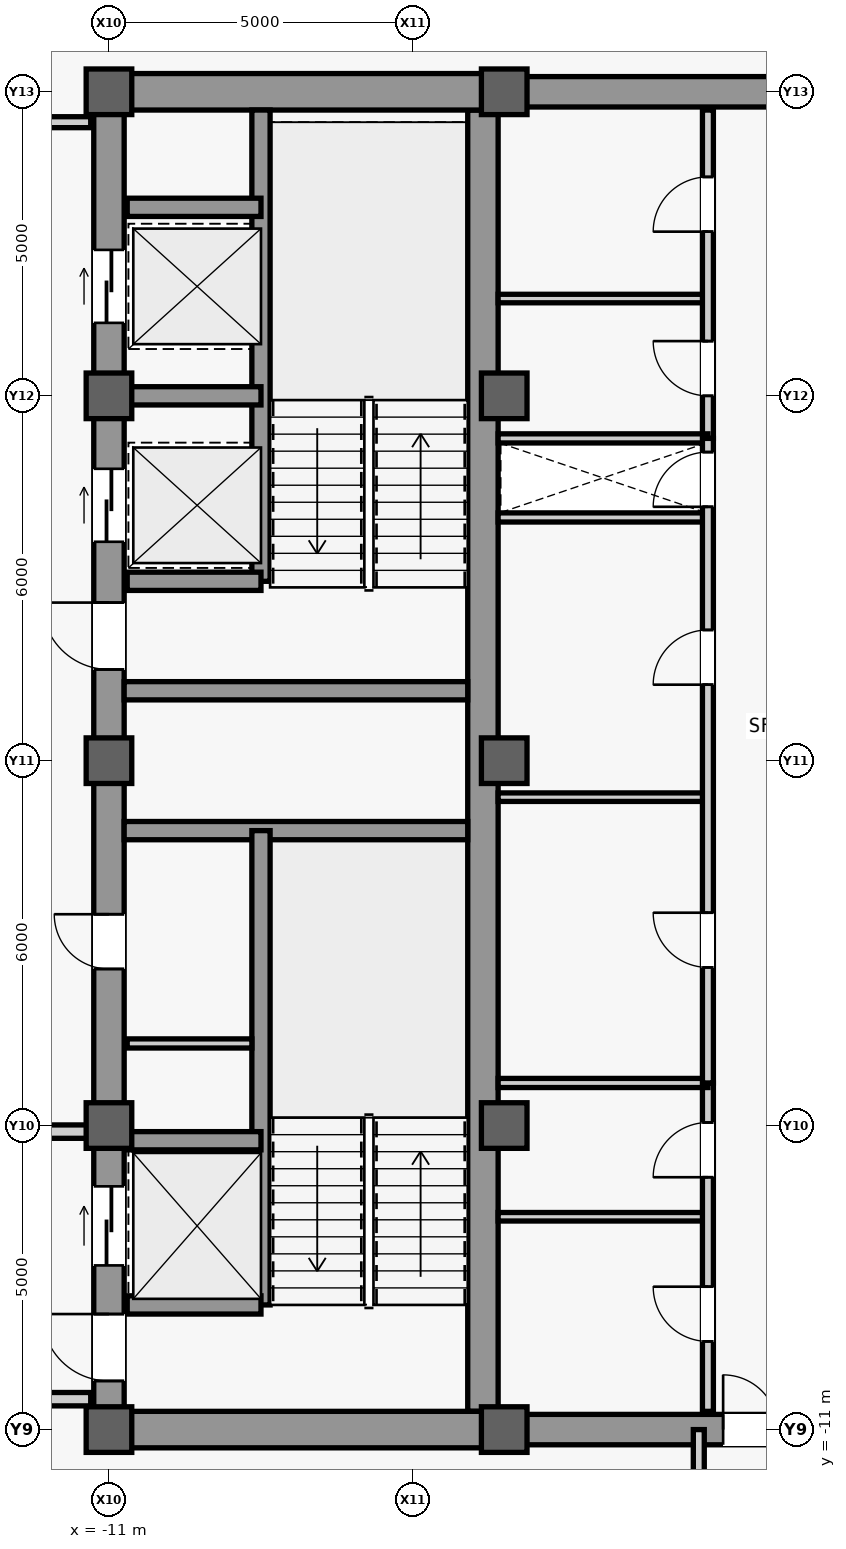
"""IFC4 building model, lengths in metres.
Left out: names, types, materials, properties, quantities, classifications, styles, units other than length and angle.
Written with IfcOpenShell. Run it as: python <this file> out.ifc"""

import sys

from ifc_helpers import new_model, si_unit, direction, frame, frame_2d, origin, origin_2d, place, context, subcontext, project, spatial, rectangle, extrude, source, transform, mapped, element, fill, save


model = new_model("IFC4")
c1 = context("Model", 3, precision=1e-05, world=origin(), true_north=direction((0.0, 1.0)))
c2 = subcontext(c1, "Body", "Model", "MODEL_VIEW")
j1 = project(units=[si_unit("LENGTHUNIT", "METRE"), si_unit("PLANEANGLEUNIT", "RADIAN")], contexts=[c1])
p1 = place(None, origin())
s1 = spatial("IfcSite", under=j1, at=p1, CompositionType="ELEMENT")
p2 = place(p1, origin())
s2 = spatial("IfcBuilding", under=s1, at=p2, CompositionType="ELEMENT")
p3 = place(p2, frame((0.0, 0.0, 289.5)))
s3 = spatial("IfcBuildingStorey", under=s2, at=p3, CompositionType="ELEMENT", Elevation=289.5)
m1 = source(origin(), c2, "Body", "SweptSolid", [
    extrude(rectangle(XDim=22.0, YDim=0.5, at=frame_2d((11.0, 0.0))), origin(), (0.0, 0.0, 1.0), 3.78),
])
p4 = place(p3, frame((-11.0, -11.0, 0.0), z_axis=(0.0, 0.0, 1.0), x_axis=(0.0, 1.0, 0.0)))
e1 = element("IfcWall", 1, at=p4, inside=s3, PredefinedType="SHEAR", context=c2, shape_type="MappedRepresentation", body=[
    mapped(m1, transform((0.0, 0.0, 0.0), scale=1.0)),
])
m2 = source(origin(), c2, "Body", "SweptSolid", [
    extrude(rectangle(XDim=1.1, YDim=2.2, at=frame_2d((0.55, 1.1))), frame((0.0, 0.26, 0.0), z_axis=(0.0, -1.0, 0.0), x_axis=(1.0, 0.0, 0.0)), (0.0, 0.0, 1.0), 0.52),
])
p5 = place(p4, frame((0.8, 0.0, 0.0)))
e2 = element("IfcOpeningElement", 2, at=p5, cuts=e1, PredefinedType="OPENING", context=c2, shape_type="MappedRepresentation", body=[
    mapped(m2, transform((0.0, 0.0, 0.0), scale=1.0)),
])
p6 = place(p4, frame((12.5, 0.0, 0.0)))
e3 = element("IfcOpeningElement", 3, at=p6, cuts=e1, PredefinedType="OPENING", context=c2, shape_type="MappedRepresentation", body=[
    mapped(m2, transform((0.0, 0.0, 0.0), scale=1.0)),
])
m3 = source(origin(), c2, "Body", "SweptSolid", [
    extrude(rectangle(XDim=0.9, YDim=2.15, at=frame_2d((0.45, 1.075))), frame((0.0, 0.26, 0.0), z_axis=(0.0, -1.0, 0.0), x_axis=(1.0, 0.0, 0.0)), (0.0, 0.0, 1.0), 0.52),
])
p7 = place(p4, frame((7.575, 0.0, 0.0)))
e4 = element("IfcOpeningElement", 4, at=p7, cuts=e1, PredefinedType="OPENING", context=c2, shape_type="MappedRepresentation", body=[
    mapped(m3, transform((0.0, 0.0, 0.0), scale=1.0)),
])
m4 = source(origin(), c2, "Body", "SweptSolid", [
    extrude(rectangle(XDim=1.2, YDim=2.3, at=frame_2d((0.6, 1.15))), frame((0.0, 0.26, 0.0), z_axis=(0.0, -1.0, 0.0), x_axis=(1.0, 0.0, 0.0)), (0.0, 0.0, 1.0), 0.52),
])
p8 = place(p4, frame((14.6, 0.0, 0.0)))
e5 = element("IfcOpeningElement", 5, at=p8, cuts=e1, PredefinedType="OPENING", context=c2, shape_type="MappedRepresentation", body=[
    mapped(m4, transform((0.0, 0.0, 0.0), scale=1.0)),
])
p9 = place(p4, frame((18.2, 0.0, 0.0)))
e6 = element("IfcOpeningElement", 6, at=p9, cuts=e1, PredefinedType="OPENING", context=c2, shape_type="MappedRepresentation", body=[
    mapped(m4, transform((0.0, 0.0, 0.0), scale=1.0)),
])
m5 = source(origin(), c2, "Body", "SweptSolid", [
    extrude(rectangle(XDim=1.3, YDim=2.3, at=frame_2d((0.65, 1.15))), frame((0.0, 0.26, 0.0), z_axis=(0.0, -1.0, 0.0), x_axis=(1.0, 0.0, 0.0)), (0.0, 0.0, 1.0), 0.52),
])
p10 = place(p4, frame((2.7, 0.0, 0.0)))
e7 = element("IfcOpeningElement", 7, at=p10, cuts=e1, PredefinedType="OPENING", context=c2, shape_type="MappedRepresentation", body=[
    mapped(m5, transform((0.0, 0.0, 0.0), scale=1.0)),
])
m6 = source(origin(), c2, "Body", "SweptSolid", [
    extrude(rectangle(XDim=21.4, YDim=0.5, at=frame_2d((10.7, 0.0))), origin(), (0.0, 0.0, 1.0), 3.78),
])
p11 = place(p3, frame((-4.85, -10.7, 0.0), z_axis=(0.0, 0.0, 1.0), x_axis=(0.0, 1.0, 0.0)))
e8 = element("IfcWall", 8, at=p11, inside=s3, PredefinedType="SHEAR", context=c2, shape_type="MappedRepresentation", body=[
    mapped(m6, transform((0.0, 0.0, 0.0), scale=1.0)),
])
m7 = source(origin(), c2, "Body", "SweptSolid", [
    extrude(rectangle(XDim=5.9, YDim=0.6, at=frame_2d((2.95, 0.0))), origin(), (0.0, 0.0, 1.0), 3.78),
])
for number, where, z_axis, x_axis in (
    (9, (-10.75, -11.0, 0.0), (0.0, 0.0, 1.0), (1.0, 0.0, 0.0)),
    (10, (-10.75, 11.0, 0.0), (0.0, 0.0, 1.0), (1.0, 0.0, 0.0)),
):
    element("IfcWall", number, at=place(p3, frame(where, z_axis=z_axis, x_axis=x_axis)), inside=s3, PredefinedType="SHEAR", context=c2, shape_type="MappedRepresentation", body=[
        mapped(m7, transform((0.0, 0.0, 0.0), scale=1.0)),
    ])
m8 = source(origin(), c2, "Body", "SweptSolid", [
    extrude(rectangle(XDim=5.65, YDim=0.3, at=frame_2d((2.825, 0.0))), origin(), (0.0, 0.0, 1.0), 3.78),
])
for number, where, z_axis, x_axis in (
    (11, (-10.75, -1.15, 0.0), (0.0, 0.0, 1.0), (1.0, 0.0, 0.0)),
    (12, (-10.75, 1.15, 0.0), (0.0, 0.0, 1.0), (1.0, 0.0, 0.0)),
):
    element("IfcWall", number, at=place(p3, frame(where, z_axis=z_axis, x_axis=x_axis)), inside=s3, PredefinedType="SHEAR", context=c2, shape_type="MappedRepresentation", body=[
        mapped(m8, transform((0.0, 0.0, 0.0), scale=1.0)),
    ])
m9 = source(origin(), c2, "Body", "SweptSolid", [
    extrude(rectangle(XDim=9.2, YDim=0.5, at=frame_2d((4.6, 0.0))), origin(), (0.0, 0.0, 1.0), 3.78),
])
p12 = place(p3, frame((-4.6, -11.0, 0.0), z_axis=(0.0, 0.0, 1.0), x_axis=(1.0, 0.0, 0.0)))
e13 = element("IfcWall", 13, at=p12, inside=s3, PredefinedType="SHEAR", context=c2, shape_type="MappedRepresentation", body=[
    mapped(m9, transform((0.0, 0.0, 0.0), scale=1.0)),
])
m10 = source(origin(), c2, "Body", "SweptSolid", [
    extrude(rectangle(XDim=1.8, YDim=2.25, at=frame_2d((0.9, 1.125))), frame((0.0, 0.26, 0.0), z_axis=(0.0, -1.0, 0.0), x_axis=(1.0, 0.0, 0.0)), (0.0, 0.0, 1.0), 0.52),
])
p13 = place(p12, frame((3.7, 0.0, 0.0)))
e14 = element("IfcOpeningElement", 14, at=p13, cuts=e13, PredefinedType="OPENING", context=c2, shape_type="MappedRepresentation", body=[
    mapped(m10, transform((0.0, 0.0, 0.0), scale=1.0)),
])
p14 = place(p3, frame((-4.6, 11.0, 0.0), z_axis=(0.0, 0.0, 1.0), x_axis=(1.0, 0.0, 0.0)))
e15 = element("IfcWall", 15, at=p14, inside=s3, PredefinedType="SHEAR", context=c2, shape_type="MappedRepresentation", body=[
    mapped(m9, transform((0.0, 0.0, 0.0), scale=1.0)),
])
m11 = source(origin(), c2, "Body", "SweptSolid", [
    extrude(rectangle(XDim=0.75, YDim=0.75, at=origin_2d()), origin(), (0.0, 0.0, 1.0), 4.0),
])
for number, where, z_axis, x_axis in (
    (16, (-11.0, -11.0, 0.0), (0.0, 0.0, 1.0), (1.0, 0.0, 0.0)),
    (17, (-11.0, -6.0, 0.0), (0.0, 0.0, 1.0), (1.0, 0.0, 0.0)),
    (18, (-11.0, 0.0, 0.0), (0.0, 0.0, 1.0), (1.0, 0.0, 0.0)),
    (19, (-11.0, 6.0, 0.0), (0.0, 0.0, 1.0), (1.0, 0.0, 0.0)),
    (20, (-11.0, 11.0, 0.0), (0.0, 0.0, 1.0), (1.0, 0.0, 0.0)),
    (21, (-4.5, -11.0, 0.0), (0.0, 0.0, 1.0), (1.0, 0.0, 0.0)),
    (22, (-4.5, -6.0, 0.0), (0.0, 0.0, 1.0), (1.0, 0.0, 0.0)),
    (23, (-4.5, 0.0, 0.0), (0.0, 0.0, 1.0), (1.0, 0.0, 0.0)),
    (24, (-4.5, 6.0, 0.0), (0.0, 0.0, 1.0), (1.0, 0.0, 0.0)),
    (25, (-4.5, 11.0, 0.0), (0.0, 0.0, 1.0), (1.0, 0.0, 0.0)),
):
    element("IfcColumn", number, at=place(p3, frame(where, z_axis=z_axis, x_axis=x_axis)), inside=s3, PredefinedType="COLUMN", context=c2, shape_type="MappedRepresentation", body=[
        mapped(m11, transform((0.0, 0.0, 0.0), scale=1.0)),
    ])
m12 = source(origin(), c2, "Body", "SweptSolid", [
    extrude(rectangle(XDim=7.8, YDim=0.3, at=frame_2d((3.9, 0.0))), origin(), (0.0, 0.0, 1.0), 3.78),
])
p15 = place(p3, frame((-8.5, -8.95, 0.0), z_axis=(0.0, 0.0, 1.0), x_axis=(0.0, 1.0, 0.0)))
e26 = element("IfcWall", 26, at=p15, inside=s3, PredefinedType="SHEAR", context=c2, shape_type="MappedRepresentation", body=[
    mapped(m12, transform((0.0, 0.0, 0.0), scale=1.0)),
])
m13 = source(origin(), c2, "Body", "SweptSolid", [
    extrude(rectangle(XDim=2.2, YDim=0.3, at=frame_2d((1.1, 0.0))), origin(), (0.0, 0.0, 1.0), 3.78),
])
for number, where, z_axis, x_axis in (
    (27, (-10.7, -8.95, 0.0), (0.0, 0.0, 1.0), (1.0, 0.0, 0.0)),
    (28, (-10.7, -6.25, 0.0), (0.0, 0.0, 1.0), (1.0, 0.0, 0.0)),
):
    element("IfcWall", number, at=place(p3, frame(where, z_axis=z_axis, x_axis=x_axis)), inside=s3, PredefinedType="SHEAR", context=c2, shape_type="MappedRepresentation", body=[
        mapped(m13, transform((0.0, 0.0, 0.0), scale=1.0)),
    ])
m14 = source(origin(), c2, "Body", "SweptSolid", [
    extrude(rectangle(XDim=7.75, YDim=0.3, at=frame_2d((3.875, 0.0))), origin(), (0.0, 0.0, 1.0), 3.78),
])
p16 = place(p3, frame((-8.5, 2.95, 0.0), z_axis=(0.0, 0.0, 1.0), x_axis=(0.0, 1.0, 0.0)))
e29 = element("IfcWall", 29, at=p16, inside=s3, PredefinedType="SHEAR", context=c2, shape_type="MappedRepresentation", body=[
    mapped(m14, transform((0.0, 0.0, 0.0), scale=1.0)),
])
for number, where, z_axis, x_axis in (
    (30, (-10.7, 2.95, 0.0), (0.0, 0.0, 1.0), (1.0, 0.0, 0.0)),
    (31, (-10.7, 6.0, 0.0), (0.0, 0.0, 1.0), (1.0, 0.0, 0.0)),
    (32, (-10.7, 9.1, 0.0), (0.0, 0.0, 1.0), (1.0, 0.0, 0.0)),
):
    element("IfcWall", number, at=place(p3, frame(where, z_axis=z_axis, x_axis=x_axis)), inside=s3, PredefinedType="SHEAR", context=c2, shape_type="MappedRepresentation", body=[
        mapped(m13, transform((0.0, 0.0, 0.0), scale=1.0)),
    ])
m15 = source(origin(), c2, "Body", "SweptSolid", [
    extrude(rectangle(XDim=2.05, YDim=0.15, at=frame_2d((1.025, 0.0))), origin(), (0.0, 0.0, 1.0), 3.78),
])
p17 = place(p3, frame((-10.7, -4.65, 0.0), z_axis=(0.0, 0.0, 1.0), x_axis=(1.0, 0.0, 0.0)))
e33 = element("IfcWall", 33, at=p17, inside=s3, PredefinedType="PARTITIONING", context=c2, shape_type="MappedRepresentation", body=[
    mapped(m15, transform((0.0, 0.0, 0.0), scale=1.0)),
])
m16 = source(origin(), c2, "Body", "SweptSolid", [
    extrude(rectangle(XDim=4.05, YDim=0.22, at=frame_2d((2.025, 0.0))), origin(), (0.0, 0.0, 1.0), 3.78),
])
p18 = place(p3, frame((-15.35, -10.5, 0.0), z_axis=(0.0, 0.0, 1.0), x_axis=(1.0, 0.0, 0.0)))
e34 = element("IfcWall", 34, at=p18, inside=s3, PredefinedType="PARTITIONING", context=c2, shape_type="MappedRepresentation", body=[
    mapped(m16, transform((0.0, 0.0, 0.0), scale=1.0)),
])
m17 = source(origin(), c2, "Body", "SweptSolid", [
    extrude(rectangle(XDim=4.05, YDim=0.22, at=frame_2d((2.025, 0.0))), origin(), (0.0, 0.0, 1.0), 3.085),
])
p19 = place(p3, frame((-15.35, -6.1, 0.0), z_axis=(0.0, 0.0, 1.0), x_axis=(1.0, 0.0, 0.0)))
e35 = element("IfcWall", 35, at=p19, inside=s3, PredefinedType="PARTITIONING", context=c2, shape_type="MappedRepresentation", body=[
    mapped(m17, transform((0.0, 0.0, 0.0), scale=1.0)),
])
m18 = source(origin(), c2, "Body", "SweptSolid", [
    extrude(rectangle(XDim=4.05, YDim=0.18, at=frame_2d((2.025, 0.0))), origin(), (0.0, 0.0, 1.0), 3.78),
])
p20 = place(p3, frame((-15.35, 10.5, 0.0), z_axis=(0.0, 0.0, 1.0), x_axis=(1.0, 0.0, 0.0)))
e36 = element("IfcWall", 36, at=p20, inside=s3, PredefinedType="PARTITIONING", context=c2, shape_type="MappedRepresentation", body=[
    mapped(m18, transform((0.0, 0.0, 0.0), scale=1.0)),
])
m19 = source(origin(), c2, "Body", "SweptSolid", [
    extrude(rectangle(XDim=3.45, YDim=0.15, at=frame_2d((1.725, 0.0))), origin(), (0.0, 0.0, 1.0), 3.78),
])
p21 = place(p3, frame((-4.6, 4.0, 0.0), z_axis=(0.0, 0.0, 1.0), x_axis=(1.0, 0.0, 0.0)))
e37 = element("IfcWall", 37, at=p21, inside=s3, PredefinedType="PARTITIONING", context=c2, shape_type="MappedRepresentation", body=[
    mapped(m19, transform((0.0, 0.0, 0.0), scale=1.0)),
])
m20 = source(origin(), c2, "Body", "SweptSolid", [
    extrude(rectangle(XDim=3.45, YDim=0.14, at=frame_2d((1.725, 0.0))), origin(), (0.0, 0.0, 1.0), 3.78),
])
p22 = place(p3, frame((-4.6, -7.5, 0.0), z_axis=(0.0, 0.0, 1.0), x_axis=(1.0, 0.0, 0.0)))
e38 = element("IfcWall", 38, at=p22, inside=s3, PredefinedType="PARTITIONING", context=c2, shape_type="MappedRepresentation", body=[
    mapped(m20, transform((0.0, 0.0, 0.0), scale=1.0)),
])
m21 = source(origin(), c2, "Body", "SweptSolid", [
    extrude(rectangle(XDim=5.4, YDim=0.18, at=frame_2d((2.7, 0.0))), origin(), (0.0, 0.0, 1.0), 3.78),
])
p23 = place(p3, frame((-1.15, -10.7, 0.0), z_axis=(0.0, 0.0, 1.0), x_axis=(0.0, 1.0, 0.0)))
e39 = element("IfcWall", 39, at=p23, inside=s3, PredefinedType="PARTITIONING", context=c2, shape_type="MappedRepresentation", body=[
    mapped(m21, transform((0.0, 0.0, 0.0), scale=1.0)),
])
m22 = source(origin(), c2, "Body", "SweptSolid", [
    extrude(rectangle(XDim=0.9, YDim=2.15, at=frame_2d((0.45, 1.075))), frame((0.0, 0.1, 0.0), z_axis=(0.0, -1.0, 0.0), x_axis=(1.0, 0.0, 0.0)), (0.0, 0.0, 1.0), 0.2),
])
p24 = place(p23, frame((1.15, 0.0, 0.0)))
e40 = element("IfcOpeningElement", 40, at=p24, cuts=e39, PredefinedType="OPENING", context=c2, shape_type="MappedRepresentation", body=[
    mapped(m22, transform((0.0, 0.0, 0.0), scale=1.0)),
])
p25 = place(p23, frame((3.85, 0.0, 0.0)))
e41 = element("IfcOpeningElement", 41, at=p25, cuts=e39, PredefinedType="OPENING", context=c2, shape_type="MappedRepresentation", body=[
    mapped(m22, transform((0.0, 0.0, 0.0), scale=1.0)),
])
p26 = place(p3, frame((-4.6, -5.3, 0.0), z_axis=(0.0, 0.0, 1.0), x_axis=(1.0, 0.0, 0.0)))
e42 = element("IfcWall", 42, at=p26, inside=s3, PredefinedType="PARTITIONING", context=c2, shape_type="MappedRepresentation", body=[
    mapped(m19, transform((0.0, 0.0, 0.0), scale=1.0)),
])
p27 = place(p3, frame((-4.6, 7.6, 0.0), z_axis=(0.0, 0.0, 1.0), x_axis=(1.0, 0.0, 0.0)))
e43 = element("IfcWall", 43, at=p27, inside=s3, PredefinedType="PARTITIONING", context=c2, shape_type="MappedRepresentation", body=[
    mapped(m20, transform((0.0, 0.0, 0.0), scale=1.0)),
])
p28 = place(p3, frame((-1.15, 5.3, 0.0), z_axis=(0.0, 0.0, 1.0), x_axis=(0.0, 1.0, 0.0)))
e44 = element("IfcWall", 44, at=p28, inside=s3, PredefinedType="PARTITIONING", context=c2, shape_type="MappedRepresentation", body=[
    mapped(m21, transform((0.0, 0.0, 0.0), scale=1.0)),
])
p29 = place(p28, frame((0.7, 0.0, 0.0)))
e45 = element("IfcOpeningElement", 45, at=p29, cuts=e44, PredefinedType="OPENING", context=c2, shape_type="MappedRepresentation", body=[
    mapped(m22, transform((0.0, 0.0, 0.0), scale=1.0)),
])
p30 = place(p28, frame((3.4, 0.0, 0.0)))
e46 = element("IfcOpeningElement", 46, at=p30, cuts=e44, PredefinedType="OPENING", context=c2, shape_type="MappedRepresentation", body=[
    mapped(m22, transform((0.0, 0.0, 0.0), scale=1.0)),
])
p31 = place(p3, frame((-4.6, 5.3, 0.0), z_axis=(0.0, 0.0, 1.0), x_axis=(1.0, 0.0, 0.0)))
e47 = element("IfcWall", 47, at=p31, inside=s3, PredefinedType="PARTITIONING", context=c2, shape_type="MappedRepresentation", body=[
    mapped(m19, transform((0.0, 0.0, 0.0), scale=1.0)),
])
p32 = place(p3, frame((-4.6, -0.6, 0.0), z_axis=(0.0, 0.0, 1.0), x_axis=(1.0, 0.0, 0.0)))
e48 = element("IfcWall", 48, at=p32, inside=s3, PredefinedType="PARTITIONING", context=c2, shape_type="MappedRepresentation", body=[
    mapped(m20, transform((0.0, 0.0, 0.0), scale=1.0)),
])
m23 = source(origin(), c2, "Body", "SweptSolid", [
    extrude(rectangle(XDim=10.6, YDim=0.18, at=frame_2d((5.3, 0.0))), origin(), (0.0, 0.0, 1.0), 3.78),
])
p33 = place(p3, frame((-1.15, -5.3, 0.0), z_axis=(0.0, 0.0, 1.0), x_axis=(0.0, 1.0, 0.0)))
e49 = element("IfcWall", 49, at=p33, inside=s3, PredefinedType="PARTITIONING", context=c2, shape_type="MappedRepresentation", body=[
    mapped(m23, transform((0.0, 0.0, 0.0), scale=1.0)),
])
p34 = place(p33, frame((1.9, 0.0, 0.0)))
e50 = element("IfcOpeningElement", 50, at=p34, cuts=e49, PredefinedType="OPENING", context=c2, shape_type="MappedRepresentation", body=[
    mapped(m22, transform((0.0, 0.0, 0.0), scale=1.0)),
])
p35 = place(p33, frame((6.55, 0.0, 0.0)))
e51 = element("IfcOpeningElement", 51, at=p35, cuts=e49, PredefinedType="OPENING", context=c2, shape_type="MappedRepresentation", body=[
    mapped(m22, transform((0.0, 0.0, 0.0), scale=1.0)),
])
p36 = place(p33, frame((9.475, 0.0, 0.0)))
e52 = element("IfcOpeningElement", 52, at=p36, cuts=e49, PredefinedType="OPENING", context=c2, shape_type="MappedRepresentation", body=[
    mapped(m22, transform((0.0, 0.0, 0.0), scale=1.0)),
])
m24 = source(origin(), c2, "Body", "SweptSolid", [
    extrude(rectangle(XDim=3.2, YDim=0.18, at=frame_2d((1.6, 0.0))), origin(), (0.0, 0.0, 1.0), 3.78),
])
p37 = place(p3, frame((-1.3, -14.2, 0.0), z_axis=(0.0, 0.0, 1.0), x_axis=(0.0, 1.0, 0.0)))
e53 = element("IfcWall", 53, at=p37, inside=s3, PredefinedType="PARTITIONING", context=c2, shape_type="MappedRepresentation", body=[
    mapped(m24, transform((0.0, 0.0, 0.0), scale=1.0)),
])
m25 = source(origin(), c2, "Body", "SweptSolid", [
    extrude(rectangle(XDim=1.1, YDim=2.2, at=frame_2d((0.55, 1.1))), frame((0.0, 0.025, 0.0), z_axis=(0.0, -1.0, 0.0), x_axis=(1.0, 0.0, 0.0)), (0.0, 0.0, 1.0), 0.05),
])
p38 = place(p5, origin())
e54 = element("IfcDoor", 54, at=p38, inside=s3, OperationType="SINGLE_SWING_RIGHT", PredefinedType="DOOR", context=c2, shape_type="MappedRepresentation", body=[
    mapped(m25, transform((0.0, 0.0, 0.0), scale=1.0)),
])
fill(e2, e54)
p39 = place(p6, origin())
e55 = element("IfcDoor", 55, at=p39, inside=s3, OperationType="SINGLE_SWING_RIGHT", PredefinedType="DOOR", context=c2, shape_type="MappedRepresentation", body=[
    mapped(m25, transform((0.0, 0.0, 0.0), scale=1.0)),
])
fill(e3, e55)
m26 = source(origin(), c2, "Body", "SweptSolid", [
    extrude(rectangle(XDim=0.9, YDim=2.15, at=frame_2d((0.45, 1.075))), frame((0.0, 0.025, 0.0), z_axis=(0.0, -1.0, 0.0), x_axis=(1.0, 0.0, 0.0)), (0.0, 0.0, 1.0), 0.05),
])
p40 = place(p7, origin())
e56 = element("IfcDoor", 56, at=p40, inside=s3, OperationType="SINGLE_SWING_RIGHT", PredefinedType="DOOR", context=c2, shape_type="MappedRepresentation", body=[
    mapped(m26, transform((0.0, 0.0, 0.0), scale=1.0)),
])
fill(e4, e56)
p41 = place(p24, origin())
e57 = element("IfcDoor", 57, at=p41, inside=s3, OperationType="SINGLE_SWING_RIGHT", PredefinedType="DOOR", context=c2, shape_type="MappedRepresentation", body=[
    mapped(m26, transform((0.0, 0.0, 0.0), scale=1.0)),
])
fill(e40, e57)
p42 = place(p25, origin())
e58 = element("IfcDoor", 58, at=p42, inside=s3, OperationType="SINGLE_SWING_LEFT", PredefinedType="DOOR", context=c2, shape_type="MappedRepresentation", body=[
    mapped(m26, transform((0.0, 0.0, 0.0), scale=1.0)),
])
fill(e41, e58)
m27 = source(origin(), c2, "Body", "SweptSolid", [
    extrude(rectangle(XDim=1.8, YDim=2.25, at=frame_2d((0.9, 1.125))), frame((0.0, 0.025, 0.0), z_axis=(0.0, -1.0, 0.0), x_axis=(1.0, 0.0, 0.0)), (0.0, 0.0, 1.0), 0.05),
])
p43 = place(p13, origin())
e59 = element("IfcDoor", 59, at=p43, inside=s3, OperationType="SINGLE_SWING_LEFT", PredefinedType="DOOR", context=c2, shape_type="MappedRepresentation", body=[
    mapped(m27, transform((0.0, 0.0, 0.0), scale=1.0)),
])
fill(e14, e59)
p44 = place(p29, origin())
e60 = element("IfcDoor", 60, at=p44, inside=s3, OperationType="SINGLE_SWING_RIGHT", PredefinedType="DOOR", context=c2, shape_type="MappedRepresentation", body=[
    mapped(m26, transform((0.0, 0.0, 0.0), scale=1.0)),
])
fill(e45, e60)
p45 = place(p30, origin())
e61 = element("IfcDoor", 61, at=p45, inside=s3, OperationType="SINGLE_SWING_LEFT", PredefinedType="DOOR", context=c2, shape_type="MappedRepresentation", body=[
    mapped(m26, transform((0.0, 0.0, 0.0), scale=1.0)),
])
fill(e46, e61)
p46 = place(p34, origin())
e62 = element("IfcDoor", 62, at=p46, inside=s3, OperationType="SINGLE_SWING_RIGHT", PredefinedType="DOOR", context=c2, shape_type="MappedRepresentation", body=[
    mapped(m26, transform((0.0, 0.0, 0.0), scale=1.0)),
])
fill(e50, e62)
p47 = place(p35, origin())
e63 = element("IfcDoor", 63, at=p47, inside=s3, OperationType="SINGLE_SWING_LEFT", PredefinedType="DOOR", context=c2, shape_type="MappedRepresentation", body=[
    mapped(m26, transform((0.0, 0.0, 0.0), scale=1.0)),
])
fill(e51, e63)
p48 = place(p36, origin())
e64 = element("IfcDoor", 64, at=p48, inside=s3, OperationType="SINGLE_SWING_LEFT", PredefinedType="DOOR", context=c2, shape_type="MappedRepresentation", body=[
    mapped(m26, transform((0.0, 0.0, 0.0), scale=1.0)),
])
fill(e52, e64)
m28 = source(origin(), c2, "Body", "SweptSolid", [
    extrude(rectangle(XDim=1.2, YDim=2.3, at=frame_2d((0.6, 1.15))), frame((0.0, 0.025, 0.0), z_axis=(0.0, -1.0, 0.0), x_axis=(1.0, 0.0, 0.0)), (0.0, 0.0, 1.0), 0.05),
])
p49 = place(p8, origin())
e65 = element("IfcDoor", 65, at=p49, inside=s3, OperationType="SLIDING_TO_LEFT", PredefinedType="DOOR", context=c2, shape_type="MappedRepresentation", body=[
    mapped(m28, transform((0.0, 0.0, 0.0), scale=1.0)),
])
fill(e5, e65)
p50 = place(p9, origin())
e66 = element("IfcDoor", 66, at=p50, inside=s3, OperationType="SLIDING_TO_LEFT", PredefinedType="DOOR", context=c2, shape_type="MappedRepresentation", body=[
    mapped(m28, transform((0.0, 0.0, 0.0), scale=1.0)),
])
fill(e6, e66)
m29 = source(origin(), c2, "Body", "SweptSolid", [
    extrude(rectangle(XDim=1.3, YDim=2.3, at=frame_2d((0.65, 1.15))), frame((0.0, 0.025, 0.0), z_axis=(0.0, -1.0, 0.0), x_axis=(1.0, 0.0, 0.0)), (0.0, 0.0, 1.0), 0.05),
])
p51 = place(p10, origin())
e67 = element("IfcDoor", 67, at=p51, inside=s3, OperationType="SLIDING_TO_LEFT", PredefinedType="DOOR", context=c2, shape_type="MappedRepresentation", body=[
    mapped(m29, transform((0.0, 0.0, 0.0), scale=1.0)),
])
fill(e7, e67)
save(model, sys.argv[1])
